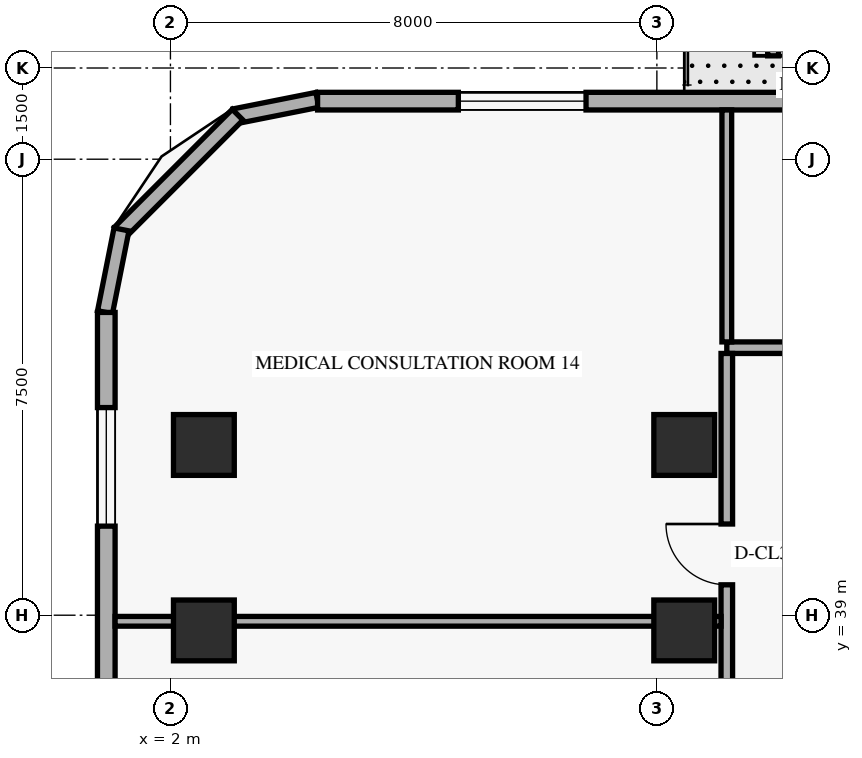
"""IFC4 building model, lengths in metres.
Left out: names, types, materials, properties, quantities, classifications, styles, units other than length and angle.
Written with IfcOpenShell. Run it as: python <this file> out.ifc"""

import sys

from ifc_helpers import new_model, si_unit, direction, frame, frame_2d, origin, origin_2d, place, context, subcontext, project, spatial, rectangle, extrude, element, fill, save


model = new_model("IFC4")
c1 = context("Model", 3, precision=1e-05, world=origin(), true_north=direction((0.0, 1.0)))
c2 = subcontext(c1, "Body", "Model", "MODEL_VIEW")
j1 = project(units=[si_unit("LENGTHUNIT", "METRE"), si_unit("PLANEANGLEUNIT", "RADIAN")], contexts=[c1])
p1 = place(None, origin())
s1 = spatial("IfcSite", under=j1, at=p1, CompositionType="ELEMENT")
p2 = place(p1, origin())
s2 = spatial("IfcBuilding", under=s1, at=p2, CompositionType="ELEMENT")
p3 = place(p2, frame((0.0, 0.0, 4.8)))
s3 = spatial("IfcBuildingStorey", under=s2, at=p3, CompositionType="ELEMENT", Elevation=4.8)
for number, where, z_axis, x_axis in (
    (1, (2.55, 38.75, 0.0), (0.0, 0.0, 1.0), (1.0, 0.0, 0.0)),
    (2, (2.55, 41.8, 0.0), (0.0, 0.0, 1.0), (1.0, 0.0, 0.0)),
    (3, (10.45, 38.75, 0.0), (0.0, 0.0, 1.0), (1.0, 0.0, 0.0)),
    (4, (10.45, 41.8, 0.0), (0.0, 0.0, 1.0), (1.0, 0.0, 0.0)),
):
    element("IfcColumn", number, at=place(p3, frame(where, z_axis=z_axis, x_axis=x_axis)), inside=s3, PredefinedType="COLUMN", context=c2, shape_type="SweptSolid", body=[
        extrude(rectangle(XDim=1.0, YDim=1.0, at=origin_2d()), origin(), (0.0, 0.0, 1.0), 4.8),
    ])
p4 = place(p3, frame((4.417, 47.476, 0.0), z_axis=(0.0, 0.0, 1.0), x_axis=(-0.980809899341, -0.19496651342, 0.0)))
e5 = element("IfcWall", 5, at=p4, inside=s3, PredefinedType="SOLIDWALL", context=c2, shape_type="SweptSolid", body=[
    extrude(rectangle(XDim=1.389, YDim=0.25, at=frame_2d((0.694, 0.0))), origin(), (0.0, 0.0, 1.0), 4.52),
])
p5 = place(p3, frame((3.105, 47.232, 0.0), z_axis=(0.0, 0.0, 1.0), x_axis=(-0.707106781187, -0.707106781187, 0.0)))
e6 = element("IfcWall", 6, at=p5, inside=s3, PredefinedType="SOLIDWALL", context=c2, shape_type="SweptSolid", body=[
    extrude(rectangle(XDim=2.739, YDim=0.25, at=frame_2d((1.37, 0.0))), origin(), (0.0, 0.0, 1.0), 4.52),
])
p6 = place(p3, frame((1.195, 45.345, 0.0), z_axis=(0.0, 0.0, 1.0), x_axis=(-0.19496651342, -0.980809899341, 0.0)))
e7 = element("IfcWall", 7, at=p6, inside=s3, PredefinedType="SOLIDWALL", context=c2, shape_type="SweptSolid", body=[
    extrude(rectangle(XDim=1.389, YDim=0.25, at=frame_2d((0.694, 0.0))), origin(), (0.0, 0.0, 1.0), 4.52),
])
p7 = place(p3, frame((50.78, 47.455, 0.0), z_axis=(0.0, 0.0, 1.0), x_axis=(-1.0, 0.0, 0.0)))
e8 = element("IfcWall", 8, at=p7, inside=s3, PredefinedType="SOLIDWALL", context=c2, shape_type="SweptSolid", body=[
    extrude(rectangle(XDim=46.36, YDim=0.29, at=frame_2d((23.18, 0.0))), origin(), (0.0, 0.0, 1.0), 4.52),
])
p8 = place(p7, frame((13.835, 0.0, 0.0)))
e9 = element("IfcOpeningElement", 9, at=p8, cuts=e8, PredefinedType="OPENING", context=c2, shape_type="SweptSolid", body=[
    extrude(rectangle(XDim=1.05, YDim=2.15, at=frame_2d((0.525, 1.075))), frame((0.0, 0.155, 0.0), z_axis=(0.0, -1.0, 0.0), x_axis=(1.0, 0.0, 0.0)), (0.0, 0.0, 1.0), 0.31),
])
p9 = place(p7, frame((27.13, 0.0, 0.0)))
e10 = element("IfcOpeningElement", 10, at=p9, cuts=e8, PredefinedType="OPENING", context=c2, shape_type="SweptSolid", body=[
    extrude(rectangle(XDim=1.4, YDim=2.15, at=frame_2d((0.7, 1.075))), frame((0.0, 0.155, 0.0), z_axis=(0.0, -1.0, 0.0), x_axis=(1.0, 0.0, 0.0)), (0.0, 0.0, 1.0), 0.31),
])
p10 = place(p7, frame((41.945, 0.0, 0.85)))
e11 = element("IfcOpeningElement", 11, at=p10, cuts=e8, PredefinedType="OPENING", context=c2, shape_type="SweptSolid", body=[
    extrude(rectangle(XDim=2.1, YDim=1.75, at=frame_2d((1.05, 0.875))), frame((0.0, 0.155, 0.0), z_axis=(0.0, -1.0, 0.0), x_axis=(1.0, 0.0, 0.0)), (0.0, 0.0, 1.0), 0.31),
])
p11 = place(p7, frame((19.982, 0.0, 0.85)))
e12 = element("IfcOpeningElement", 12, at=p11, cuts=e8, PredefinedType="OPENING", context=c2, shape_type="SweptSolid", body=[
    extrude(rectangle(XDim=2.1, YDim=1.75, at=frame_2d((1.05, 0.875))), frame((0.0, 0.155, 0.0), z_axis=(0.0, -1.0, 0.0), x_axis=(1.0, 0.0, 0.0)), (0.0, 0.0, 1.0), 0.31),
])
p12 = place(p7, frame((5.565, 0.0, 0.85)))
e13 = element("IfcOpeningElement", 13, at=p12, cuts=e8, PredefinedType="OPENING", context=c2, shape_type="SweptSolid", body=[
    extrude(rectangle(XDim=2.1, YDim=1.75, at=frame_2d((1.05, 0.875))), frame((0.0, 0.155, 0.0), z_axis=(0.0, -1.0, 0.0), x_axis=(1.0, 0.0, 0.0)), (0.0, 0.0, 1.0), 0.31),
])
p13 = place(p3, frame((0.945, 43.98, 0.0), z_axis=(0.0, 0.0, 1.0), x_axis=(0.0, -1.0, 0.0)))
e14 = element("IfcWall", 14, at=p13, inside=s3, PredefinedType="SOLIDWALL", context=c2, shape_type="SweptSolid", body=[
    extrude(rectangle(XDim=20.23, YDim=0.29, at=frame_2d((10.115, 0.0))), origin(), (0.0, 0.0, 1.0), 4.52),
])
p14 = place(p13, frame((11.68, 0.0, 0.85)))
e15 = element("IfcOpeningElement", 15, at=p14, cuts=e14, PredefinedType="OPENING", context=c2, shape_type="SweptSolid", body=[
    extrude(rectangle(XDim=1.95, YDim=1.75, at=frame_2d((0.975, 0.875))), frame((0.0, 0.155, 0.0), z_axis=(0.0, -1.0, 0.0), x_axis=(1.0, 0.0, 0.0)), (0.0, 0.0, 1.0), 0.31),
])
p15 = place(p13, frame((1.565, 0.0, 0.85)))
e16 = element("IfcOpeningElement", 16, at=p15, cuts=e14, PredefinedType="OPENING", context=c2, shape_type="SweptSolid", body=[
    extrude(rectangle(XDim=1.95, YDim=1.75, at=frame_2d((0.975, 0.875))), frame((0.0, 0.155, 0.0), z_axis=(0.0, -1.0, 0.0), x_axis=(1.0, 0.0, 0.0)), (0.0, 0.0, 1.0), 0.31),
])
p16 = place(p3, frame((11.822, 48.315, 0.0), z_axis=(0.0, 0.0, 1.0), x_axis=(1.0, 0.0, 0.0)))
e17 = element("IfcWall", 17, at=p16, inside=s3, PredefinedType="SOLIDWALL", context=c2, shape_type="SweptSolid", body=[
    extrude(rectangle(XDim=2.276, YDim=0.23, at=frame_2d((1.138, 0.0))), origin(), (0.0, 0.0, 1.0), 2.287),
])
p17 = place(p16, frame((0.18, 0.0, 0.0)))
e18 = element("IfcOpeningElement", 18, at=p17, cuts=e17, PredefinedType="OPENING", context=c2, shape_type="SweptSolid", body=[
    extrude(rectangle(XDim=0.96, YDim=2.08, at=frame_2d((0.48, 1.04))), frame((0.0, 0.125, 0.0), z_axis=(0.0, -1.0, 0.0), x_axis=(1.0, 0.0, 0.0)), (0.0, 0.0, 1.0), 0.25),
])
p18 = place(p3, frame((11.15, 43.4, 0.0), z_axis=(0.0, 0.0, 1.0), x_axis=(1.0, 0.0, 0.0)))
e19 = element("IfcWall", 19, at=p18, inside=s3, PredefinedType="STANDARD", context=c2, shape_type="SweptSolid", body=[
    extrude(rectangle(XDim=1.85, YDim=0.19, at=frame_2d((0.925, 0.0))), origin(), (0.0, 0.0, 1.0), 4.52),
])
p19 = place(p3, frame((11.15, 4.695, 0.0), z_axis=(0.0, 0.0, 1.0), x_axis=(0.0, 1.0, 0.0)))
e20 = element("IfcWall", 20, at=p19, inside=s3, PredefinedType="STANDARD", context=c2, shape_type="SweptSolid", body=[
    extrude(rectangle(XDim=38.61, YDim=0.19, at=frame_2d((19.305, 0.0))), origin(), (0.0, 0.0, 1.0), 3.502),
])
p20 = place(p19, frame((2.755, 0.0, 0.0)))
e21 = element("IfcOpeningElement", 21, at=p20, cuts=e20, PredefinedType="OPENING", context=c2, shape_type="SweptSolid", body=[
    extrude(rectangle(XDim=1.0, YDim=2.15, at=frame_2d((0.5, 1.075))), frame((0.0, 0.105, 0.0), z_axis=(0.0, -1.0, 0.0), x_axis=(1.0, 0.0, 0.0)), (0.0, 0.0, 1.0), 0.21),
])
p21 = place(p19, frame((11.215, 0.0, 0.0)))
e22 = element("IfcOpeningElement", 22, at=p21, cuts=e20, PredefinedType="OPENING", context=c2, shape_type="SweptSolid", body=[
    extrude(rectangle(XDim=1.0, YDim=2.15, at=frame_2d((0.5, 1.075))), frame((0.0, 0.105, 0.0), z_axis=(0.0, -1.0, 0.0), x_axis=(1.0, 0.0, 0.0)), (0.0, 0.0, 1.0), 0.21),
])
p22 = place(p19, frame((26.255, 0.0, 0.0)))
e23 = element("IfcOpeningElement", 23, at=p22, cuts=e20, PredefinedType="OPENING", context=c2, shape_type="SweptSolid", body=[
    extrude(rectangle(XDim=1.0, YDim=2.15, at=frame_2d((0.5, 1.075))), frame((0.0, 0.105, 0.0), z_axis=(0.0, -1.0, 0.0), x_axis=(1.0, 0.0, 0.0)), (0.0, 0.0, 1.0), 0.21),
])
p23 = place(p19, frame((34.805, 0.0, 0.0)))
e24 = element("IfcOpeningElement", 24, at=p23, cuts=e20, PredefinedType="OPENING", context=c2, shape_type="SweptSolid", body=[
    extrude(rectangle(XDim=1.0, YDim=2.15, at=frame_2d((0.5, 1.075))), frame((0.0, 0.105, 0.0), z_axis=(0.0, -1.0, 0.0), x_axis=(1.0, 0.0, 0.0)), (0.0, 0.0, 1.0), 0.21),
])
p24 = place(p3, frame((11.15, 43.495, 0.0), z_axis=(0.0, 0.0, 1.0), x_axis=(0.0, 1.0, 0.0)))
e25 = element("IfcWall", 25, at=p24, inside=s3, PredefinedType="PARTITIONING", context=c2, shape_type="SweptSolid", body=[
    extrude(rectangle(XDim=3.815, YDim=0.16, at=frame_2d((1.907, 0.0))), origin(), (0.0, 0.0, 1.0), 4.52),
])
p25 = place(p3, frame((1.09, 38.9, 0.0), z_axis=(0.0, 0.0, 1.0), x_axis=(1.0, 0.0, 0.0)))
e26 = element("IfcWall", 26, at=p25, inside=s3, PredefinedType="PARTITIONING", context=c2, shape_type="SweptSolid", body=[
    extrude(rectangle(XDim=9.965, YDim=0.16, at=frame_2d((4.982, 0.0))), origin(), (0.0, 0.0, 1.0), 3.502),
])
p26 = place(p10, origin())
e27 = element("IfcWindow", 27, at=p26, inside=s3, PartitioningType="SINGLE_PANEL", PredefinedType="WINDOW", context=c2, shape_type="SweptSolid", body=[
    extrude(rectangle(XDim=2.1, YDim=1.75, at=frame_2d((1.05, 0.875))), frame((0.0, 0.03, 0.0), z_axis=(0.0, -1.0, 0.0), x_axis=(1.0, 0.0, 0.0)), (0.0, 0.0, 1.0), 0.06),
])
fill(e11, e27)
p27 = place(p15, origin())
e28 = element("IfcWindow", 28, at=p27, inside=s3, PartitioningType="SINGLE_PANEL", PredefinedType="WINDOW", context=c2, shape_type="SweptSolid", body=[
    extrude(rectangle(XDim=1.95, YDim=1.75, at=frame_2d((0.975, 0.875))), frame((0.0, 0.03, 0.0), z_axis=(0.0, -1.0, 0.0), x_axis=(1.0, 0.0, 0.0)), (0.0, 0.0, 1.0), 0.06),
])
fill(e16, e28)
p28 = place(p23, origin())
e29 = element("IfcDoor", 29, at=p28, inside=s3, OperationType="SINGLE_SWING_RIGHT", PredefinedType="DOOR", context=c2, shape_type="SweptSolid", body=[
    extrude(rectangle(XDim=1.0, YDim=2.15, at=frame_2d((0.5, 1.075))), frame((0.0, 0.025, 0.0), z_axis=(0.0, -1.0, 0.0), x_axis=(1.0, 0.0, 0.0)), (0.0, 0.0, 1.0), 0.05),
])
fill(e24, e29)
save(model, sys.argv[1])
